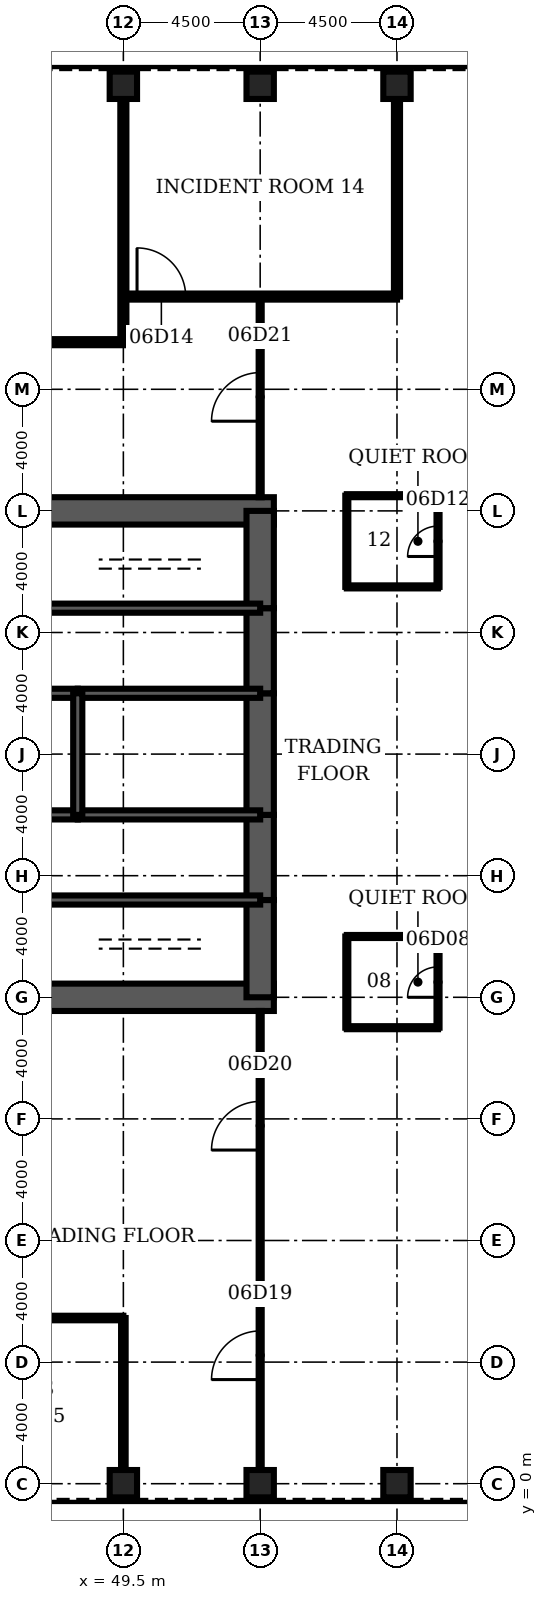
"""IFC4 building model, lengths in metres.
Left out: names, types, materials, properties, quantities, classifications, styles, units other than length and angle.
Written with IfcOpenShell. Run it as: python <this file> out.ifc"""

import sys

from ifc_helpers import new_model, si_unit, direction, frame, frame_2d, origin, origin_2d, place, context, subcontext, project, spatial, rectangle, hollow_rectangle, extrude, element, fill, save


model = new_model("IFC4")
c1 = context("Model", 3, precision=1e-05, world=origin(), true_north=direction((0.0, 1.0)))
c2 = subcontext(c1, "Body", "Model", "MODEL_VIEW")
j1 = project(units=[si_unit("LENGTHUNIT", "METRE"), si_unit("PLANEANGLEUNIT", "RADIAN")], contexts=[c1])
p1 = place(None, origin())
s1 = spatial("IfcSite", under=j1, at=p1, CompositionType="ELEMENT")
p2 = place(p1, origin())
s2 = spatial("IfcBuilding", under=s1, at=p2, CompositionType="ELEMENT")
p3 = place(p2, frame((0.0, 0.0, 32.0)))
s3 = spatial("IfcBuildingStorey", under=s2, at=p3, CompositionType="ELEMENT", Elevation=32.0)
for number, where, z_axis, x_axis in (
    (1, (49.5, 0.0, 0.0), (0.0, 0.0, 1.0), (0.0, 1.0, 0.0)),
    (2, (54.0, 0.0, 0.0), (0.0, 0.0, 1.0), (0.0, 1.0, 0.0)),
    (3, (58.5, 0.0, 0.0), (0.0, 0.0, 1.0), (0.0, 1.0, 0.0)),
    (4, (58.5, 46.0, 0.0), (0.0, 0.0, 1.0), (0.0, 1.0, 0.0)),
    (5, (54.0, 46.0, 0.0), (0.0, 0.0, 1.0), (0.0, 1.0, 0.0)),
    (6, (49.5, 46.0, 0.0), (0.0, 0.0, 1.0), (0.0, 1.0, 0.0)),
):
    element("IfcColumn", number, at=place(p3, frame(where, z_axis=z_axis, x_axis=x_axis)), inside=s3, PredefinedType="COLUMN", context=c2, shape_type="SweptSolid", body=[
        extrude(hollow_rectangle(XDim=0.9, YDim=0.9, WallThickness=0.12, at=origin_2d()), origin(), (0.0, 0.0, 1.0), 4.5),
    ])
for number, where, z_axis, x_axis in (
    (7, (45.0, 16.0, 0.0), (0.0, 0.0, 1.0), (1.0, 0.0, 0.0)),
    (8, (54.45, 32.0, 0.0), (0.0, 0.0, 1.0), (-1.0, 0.0, 0.0)),
):
    element("IfcWall", number, at=place(p3, frame(where, z_axis=z_axis, x_axis=x_axis)), inside=s3, PredefinedType="SHEAR", context=c2, shape_type="SweptSolid", body=[
        extrude(rectangle(XDim=9.45, YDim=0.9, at=frame_2d((4.725, 0.0))), origin(), (0.0, 0.0, 1.0), 4.5),
    ])
p4 = place(p3, frame((54.0, 16.0, 0.0), z_axis=(0.0, 0.0, 1.0), x_axis=(0.0, 1.0, 0.0)))
e9 = element("IfcWall", 9, at=p4, inside=s3, PredefinedType="SHEAR", context=c2, shape_type="SweptSolid", body=[
    extrude(rectangle(XDim=3.2, YDim=0.9, at=frame_2d((1.6, 0.0))), origin(), (0.0, 0.0, 1.0), 4.5),
])
p5 = place(p3, frame((54.0, 19.2, 0.0), z_axis=(0.0, 0.0, 1.0), x_axis=(0.0, 1.0, 0.0)))
e10 = element("IfcWall", 10, at=p5, inside=s3, PredefinedType="SHEAR", context=c2, shape_type="SweptSolid", body=[
    extrude(rectangle(XDim=2.8, YDim=0.9, at=frame_2d((1.4, 0.0))), origin(), (0.0, 0.0, 1.0), 4.5),
])
p6 = place(p5, frame((0.4, 0.0, 0.0)))
e11 = element("IfcOpeningElement", 11, at=p6, cuts=e10, PredefinedType="OPENING", context=c2, shape_type="SweptSolid", body=[
    extrude(rectangle(XDim=1.8, YDim=2.1, at=frame_2d((0.9, 1.05))), frame((0.0, 0.46, 0.0), z_axis=(0.0, -1.0, 0.0), x_axis=(1.0, 0.0, 0.0)), (0.0, 0.0, 1.0), 0.92),
])
p7 = place(p3, frame((54.0, 22.0, 0.0), z_axis=(0.0, 0.0, 1.0), x_axis=(0.0, 1.0, 0.0)))
e12 = element("IfcWall", 12, at=p7, inside=s3, PredefinedType="SHEAR", context=c2, shape_type="SweptSolid", body=[
    extrude(rectangle(XDim=4.0, YDim=0.9, at=frame_2d((2.0, 0.0))), origin(), (0.0, 0.0, 1.0), 4.5),
])
p8 = place(p3, frame((54.0, 26.0, 0.0), z_axis=(0.0, 0.0, 1.0), x_axis=(0.0, 1.0, 0.0)))
e13 = element("IfcWall", 13, at=p8, inside=s3, PredefinedType="SHEAR", context=c2, shape_type="SweptSolid", body=[
    extrude(rectangle(XDim=2.8, YDim=0.9, at=frame_2d((1.4, 0.0))), origin(), (0.0, 0.0, 1.0), 4.5),
])
p9 = place(p8, frame((0.6, 0.0, 0.0)))
e14 = element("IfcOpeningElement", 14, at=p9, cuts=e13, PredefinedType="OPENING", context=c2, shape_type="SweptSolid", body=[
    extrude(rectangle(XDim=1.8, YDim=2.1, at=frame_2d((0.9, 1.05))), frame((0.0, 0.46, 0.0), z_axis=(0.0, -1.0, 0.0), x_axis=(1.0, 0.0, 0.0)), (0.0, 0.0, 1.0), 0.92),
])
p10 = place(p3, frame((54.0, 28.8, 0.0), z_axis=(0.0, 0.0, 1.0), x_axis=(0.0, 1.0, 0.0)))
e15 = element("IfcWall", 15, at=p10, inside=s3, PredefinedType="SHEAR", context=c2, shape_type="SweptSolid", body=[
    extrude(rectangle(XDim=3.2, YDim=0.9, at=frame_2d((1.6, 0.0))), origin(), (0.0, 0.0, 1.0), 4.5),
])
p11 = place(p3, frame((45.0, 19.2, 0.0), z_axis=(0.0, 0.0, 1.0), x_axis=(1.0, 0.0, 0.0)))
e16 = element("IfcWall", 16, at=p11, inside=s3, PredefinedType="SOLIDWALL", context=c2, shape_type="SweptSolid", body=[
    extrude(rectangle(XDim=9.0, YDim=0.3, at=frame_2d((4.5, 0.0))), origin(), (0.0, 0.0, 1.0), 4.5),
])
p12 = place(p11, frame((7.35, 0.0, 0.0)))
e17 = element("IfcOpeningElement", 17, at=p12, cuts=e16, PredefinedType="OPENING", context=c2, shape_type="SweptSolid", body=[
    extrude(rectangle(XDim=1.0, YDim=2.1, at=frame_2d((0.5, 1.05))), frame((0.0, 0.16, 0.0), z_axis=(0.0, -1.0, 0.0), x_axis=(1.0, 0.0, 0.0)), (0.0, 0.0, 1.0), 0.32),
])
p13 = place(p3, frame((45.0, 28.8, 0.0), z_axis=(0.0, 0.0, 1.0), x_axis=(1.0, 0.0, 0.0)))
e18 = element("IfcWall", 18, at=p13, inside=s3, PredefinedType="SOLIDWALL", context=c2, shape_type="SweptSolid", body=[
    extrude(rectangle(XDim=9.0, YDim=0.3, at=frame_2d((4.5, 0.0))), origin(), (0.0, 0.0, 1.0), 4.5),
])
p14 = place(p13, frame((7.35, 0.0, 0.0)))
e19 = element("IfcOpeningElement", 19, at=p14, cuts=e18, PredefinedType="OPENING", context=c2, shape_type="SweptSolid", body=[
    extrude(rectangle(XDim=1.0, YDim=2.1, at=frame_2d((0.5, 1.05))), frame((0.0, 0.16, 0.0), z_axis=(0.0, -1.0, 0.0), x_axis=(1.0, 0.0, 0.0)), (0.0, 0.0, 1.0), 0.32),
])
p15 = place(p3, frame((45.0, 22.0, 0.0), z_axis=(0.0, 0.0, 1.0), x_axis=(1.0, 0.0, 0.0)))
e20 = element("IfcWall", 20, at=p15, inside=s3, PredefinedType="SOLIDWALL", context=c2, shape_type="SweptSolid", body=[
    extrude(rectangle(XDim=3.0, YDim=0.3, at=frame_2d((1.5, 0.0))), origin(), (0.0, 0.0, 1.0), 4.5),
])
p16 = place(p15, frame((1.0, 0.0, 0.0)))
e21 = element("IfcOpeningElement", 21, at=p16, cuts=e20, PredefinedType="OPENING", context=c2, shape_type="SweptSolid", body=[
    extrude(rectangle(XDim=1.0, YDim=2.1, at=frame_2d((0.5, 1.05))), frame((0.0, 0.16, 0.0), z_axis=(0.0, -1.0, 0.0), x_axis=(1.0, 0.0, 0.0)), (0.0, 0.0, 1.0), 0.32),
])
p17 = place(p3, frame((48.0, 22.0, 0.0), z_axis=(0.0, 0.0, 1.0), x_axis=(1.0, 0.0, 0.0)))
e22 = element("IfcWall", 22, at=p17, inside=s3, PredefinedType="SOLIDWALL", context=c2, shape_type="SweptSolid", body=[
    extrude(rectangle(XDim=6.0, YDim=0.3, at=frame_2d((3.0, 0.0))), origin(), (0.0, 0.0, 1.0), 4.5),
])
p18 = place(p17, frame((2.0, 0.0, 0.0)))
e23 = element("IfcOpeningElement", 23, at=p18, cuts=e22, PredefinedType="OPENING", context=c2, shape_type="SweptSolid", body=[
    extrude(rectangle(XDim=1.0, YDim=2.1, at=frame_2d((0.5, 1.05))), frame((0.0, 0.16, 0.0), z_axis=(0.0, -1.0, 0.0), x_axis=(1.0, 0.0, 0.0)), (0.0, 0.0, 1.0), 0.32),
])
p19 = place(p3, frame((45.0, 26.0, 0.0), z_axis=(0.0, 0.0, 1.0), x_axis=(1.0, 0.0, 0.0)))
e24 = element("IfcWall", 24, at=p19, inside=s3, PredefinedType="SOLIDWALL", context=c2, shape_type="SweptSolid", body=[
    extrude(rectangle(XDim=3.0, YDim=0.3, at=frame_2d((1.5, 0.0))), origin(), (0.0, 0.0, 1.0), 4.5),
])
p20 = place(p3, frame((48.0, 26.0, 0.0), z_axis=(0.0, 0.0, 1.0), x_axis=(1.0, 0.0, 0.0)))
e25 = element("IfcWall", 25, at=p20, inside=s3, PredefinedType="SOLIDWALL", context=c2, shape_type="SweptSolid", body=[
    extrude(rectangle(XDim=6.0, YDim=0.3, at=frame_2d((3.0, 0.0))), origin(), (0.0, 0.0, 1.0), 4.5),
])
p21 = place(p3, frame((48.0, 22.0, 0.0), z_axis=(0.0, 0.0, 1.0), x_axis=(0.0, 1.0, 0.0)))
e26 = element("IfcWall", 26, at=p21, inside=s3, PredefinedType="SOLIDWALL", context=c2, shape_type="SweptSolid", body=[
    extrude(rectangle(XDim=4.0, YDim=0.3, at=frame_2d((2.0, 0.0))), origin(), (0.0, 0.0, 1.0), 4.5),
])
p22 = place(p3, frame((48.6, 19.35, 0.0), z_axis=(0.0, 0.0, 1.0), x_axis=(0.0, 1.0, 0.0)))
e27 = element("IfcWall", 27, at=p22, inside=s3, PredefinedType="PARTITIONING", context=c2, shape_type="SweptSolid", body=[
    extrude(rectangle(XDim=2.5, YDim=0.15, at=frame_2d((1.25, 0.0))), origin(), (0.0, 0.0, 1.0), 3.0),
])
p23 = place(p22, frame((1.15, 0.0, 0.0)))
e28 = element("IfcOpeningElement", 28, at=p23, cuts=e27, PredefinedType="OPENING", context=c2, shape_type="SweptSolid", body=[
    extrude(rectangle(XDim=1.0, YDim=2.1, at=frame_2d((0.5, 1.05))), frame((0.0, 0.085, 0.0), z_axis=(0.0, -1.0, 0.0), x_axis=(1.0, 0.0, 0.0)), (0.0, 0.0, 1.0), 0.17),
])
p24 = place(p3, frame((22.5, 5.45, 0.0), z_axis=(0.0, 0.0, 1.0), x_axis=(1.0, 0.0, 0.0)))
e29 = element("IfcWall", 29, at=p24, inside=s3, PredefinedType="PARTITIONING", context=c2, shape_type="SweptSolid", body=[
    extrude(rectangle(XDim=27.0, YDim=0.15, at=frame_2d((13.5, 0.0))), origin(), (0.0, 0.0, 1.0), 3.0),
])
p25 = place(p24, frame((0.45, 0.0, 0.0)))
e30 = element("IfcOpeningElement", 30, at=p25, cuts=e29, PredefinedType="OPENING", context=c2, shape_type="SweptSolid", body=[
    extrude(rectangle(XDim=1.0, YDim=2.1, at=frame_2d((0.5, 1.05))), frame((0.0, 0.085, 0.0), z_axis=(0.0, -1.0, 0.0), x_axis=(1.0, 0.0, 0.0)), (0.0, 0.0, 1.0), 0.17),
])
p26 = place(p24, frame((4.95, 0.0, 0.0)))
e31 = element("IfcOpeningElement", 31, at=p26, cuts=e29, PredefinedType="OPENING", context=c2, shape_type="SweptSolid", body=[
    extrude(rectangle(XDim=1.0, YDim=2.1, at=frame_2d((0.5, 1.05))), frame((0.0, 0.085, 0.0), z_axis=(0.0, -1.0, 0.0), x_axis=(1.0, 0.0, 0.0)), (0.0, 0.0, 1.0), 0.17),
])
p27 = place(p24, frame((9.45, 0.0, 0.0)))
e32 = element("IfcOpeningElement", 32, at=p27, cuts=e29, PredefinedType="OPENING", context=c2, shape_type="SweptSolid", body=[
    extrude(rectangle(XDim=1.0, YDim=2.1, at=frame_2d((0.5, 1.05))), frame((0.0, 0.085, 0.0), z_axis=(0.0, -1.0, 0.0), x_axis=(1.0, 0.0, 0.0)), (0.0, 0.0, 1.0), 0.17),
])
p28 = place(p24, frame((13.95, 0.0, 0.0)))
e33 = element("IfcOpeningElement", 33, at=p28, cuts=e29, PredefinedType="OPENING", context=c2, shape_type="SweptSolid", body=[
    extrude(rectangle(XDim=1.0, YDim=2.1, at=frame_2d((0.5, 1.05))), frame((0.0, 0.085, 0.0), z_axis=(0.0, -1.0, 0.0), x_axis=(1.0, 0.0, 0.0)), (0.0, 0.0, 1.0), 0.17),
])
p29 = place(p24, frame((22.0, 0.0, 0.0)))
e34 = element("IfcOpeningElement", 34, at=p29, cuts=e29, PredefinedType="OPENING", context=c2, shape_type="SweptSolid", body=[
    extrude(rectangle(XDim=1.0, YDim=2.1, at=frame_2d((0.5, 1.05))), frame((0.0, 0.085, 0.0), z_axis=(0.0, -1.0, 0.0), x_axis=(1.0, 0.0, 0.0)), (0.0, 0.0, 1.0), 0.17),
])
for number, where, z_axis, x_axis in (
    (35, (56.85, 15.0, 0.0), (0.0, 0.0, 1.0), (1.0, 0.0, 0.0)),
    (36, (56.85, 18.0, 0.0), (0.0, 0.0, 1.0), (1.0, 0.0, 0.0)),
    (37, (56.85, 29.5, 0.0), (0.0, 0.0, 1.0), (1.0, 0.0, 0.0)),
    (38, (56.85, 32.5, 0.0), (0.0, 0.0, 1.0), (1.0, 0.0, 0.0)),
):
    element("IfcWall", number, at=place(p3, frame(where, z_axis=z_axis, x_axis=x_axis)), inside=s3, PredefinedType="PARTITIONING", context=c2, shape_type="SweptSolid", body=[
        extrude(rectangle(XDim=3.0, YDim=0.1, at=frame_2d((1.5, 0.0))), origin(), (0.0, 0.0, 1.0), 3.0),
    ])
p30 = place(p3, frame((22.5, 37.55, 0.0), z_axis=(0.0, 0.0, 1.0), x_axis=(1.0, 0.0, 0.0)))
e39 = element("IfcWall", 39, at=p30, inside=s3, PredefinedType="PARTITIONING", context=c2, shape_type="SweptSolid", body=[
    extrude(rectangle(XDim=27.0, YDim=0.2, at=frame_2d((13.5, 0.0))), origin(), (0.0, 0.0, 1.0), 3.0),
])
p31 = place(p30, frame((12.7, 0.0, 0.0)))
e40 = element("IfcOpeningElement", 40, at=p31, cuts=e39, PredefinedType="OPENING", context=c2, shape_type="SweptSolid", body=[
    extrude(rectangle(XDim=1.6, YDim=2.1, at=frame_2d((0.8, 1.05))), frame((0.0, 0.11, 0.0), z_axis=(0.0, -1.0, 0.0), x_axis=(1.0, 0.0, 0.0)), (0.0, 0.0, 1.0), 0.22),
])
p32 = place(p3, frame((49.5, 39.05, 0.0), z_axis=(0.0, 0.0, 1.0), x_axis=(1.0, 0.0, 0.0)))
e41 = element("IfcWall", 41, at=p32, inside=s3, PredefinedType="PARTITIONING", context=c2, shape_type="SweptSolid", body=[
    extrude(rectangle(XDim=9.0, YDim=0.2, at=frame_2d((4.5, 0.0))), origin(), (0.0, 0.0, 1.0), 3.0),
])
p33 = place(p32, frame((0.45, 0.0, 0.0)))
e42 = element("IfcOpeningElement", 42, at=p33, cuts=e41, PredefinedType="OPENING", context=c2, shape_type="SweptSolid", body=[
    extrude(rectangle(XDim=1.6, YDim=2.1, at=frame_2d((0.8, 1.05))), frame((0.0, 0.11, 0.0), z_axis=(0.0, -1.0, 0.0), x_axis=(1.0, 0.0, 0.0)), (0.0, 0.0, 1.0), 0.22),
])
p34 = place(p3, frame((49.5, 0.45, 0.0), z_axis=(0.0, 0.0, 1.0), x_axis=(0.0, 1.0, 0.0)))
e43 = element("IfcWall", 43, at=p34, inside=s3, PredefinedType="PARTITIONING", context=c2, shape_type="SweptSolid", body=[
    extrude(rectangle(XDim=5.0, YDim=0.15, at=frame_2d((2.5, 0.0))), origin(), (0.0, 0.0, 1.0), 3.0),
])
p35 = place(p3, frame((49.5, 37.55, 0.0), z_axis=(0.0, 0.0, 1.0), x_axis=(0.0, 1.0, 0.0)))
e44 = element("IfcWall", 44, at=p35, inside=s3, PredefinedType="PARTITIONING", context=c2, shape_type="SweptSolid", body=[
    extrude(rectangle(XDim=8.0, YDim=0.2, at=frame_2d((4.0, 0.0))), origin(), (0.0, 0.0, 1.0), 3.0),
])
p36 = place(p3, frame((54.0, 0.45, 0.0), z_axis=(0.0, 0.0, 1.0), x_axis=(0.0, 1.0, 0.0)))
e45 = element("IfcWall", 45, at=p36, inside=s3, PredefinedType="PARTITIONING", context=c2, shape_type="SweptSolid", body=[
    extrude(rectangle(XDim=15.1, YDim=0.1, at=frame_2d((7.55, 0.0))), origin(), (0.0, 0.0, 1.0), 3.0),
])
p37 = place(p36, frame((2.975, 0.0, 0.0)))
e46 = element("IfcOpeningElement", 46, at=p37, cuts=e45, PredefinedType="OPENING", context=c2, shape_type="SweptSolid", body=[
    extrude(rectangle(XDim=1.6, YDim=2.1, at=frame_2d((0.8, 1.05))), frame((0.0, 0.06, 0.0), z_axis=(0.0, -1.0, 0.0), x_axis=(1.0, 0.0, 0.0)), (0.0, 0.0, 1.0), 0.12),
])
p38 = place(p36, frame((10.525, 0.0, 0.0)))
e47 = element("IfcOpeningElement", 47, at=p38, cuts=e45, PredefinedType="OPENING", context=c2, shape_type="SweptSolid", body=[
    extrude(rectangle(XDim=1.6, YDim=2.1, at=frame_2d((0.8, 1.05))), frame((0.0, 0.06, 0.0), z_axis=(0.0, -1.0, 0.0), x_axis=(1.0, 0.0, 0.0)), (0.0, 0.0, 1.0), 0.12),
])
p39 = place(p3, frame((54.0, 32.45, 0.0), z_axis=(0.0, 0.0, 1.0), x_axis=(0.0, 1.0, 0.0)))
e48 = element("IfcWall", 48, at=p39, inside=s3, PredefinedType="PARTITIONING", context=c2, shape_type="SweptSolid", body=[
    extrude(rectangle(XDim=6.6, YDim=0.1, at=frame_2d((3.3, 0.0))), origin(), (0.0, 0.0, 1.0), 3.0),
])
p40 = place(p39, frame((2.5, 0.0, 0.0)))
e49 = element("IfcOpeningElement", 49, at=p40, cuts=e48, PredefinedType="OPENING", context=c2, shape_type="SweptSolid", body=[
    extrude(rectangle(XDim=1.6, YDim=2.1, at=frame_2d((0.8, 1.05))), frame((0.0, 0.06, 0.0), z_axis=(0.0, -1.0, 0.0), x_axis=(1.0, 0.0, 0.0)), (0.0, 0.0, 1.0), 0.12),
])
for number, where, z_axis, x_axis in (
    (50, (56.85, 15.0, 0.0), (0.0, 0.0, 1.0), (0.0, 1.0, 0.0)),
    (51, (56.85, 29.5, 0.0), (0.0, 0.0, 1.0), (0.0, 1.0, 0.0)),
):
    element("IfcWall", number, at=place(p3, frame(where, z_axis=z_axis, x_axis=x_axis)), inside=s3, PredefinedType="PARTITIONING", context=c2, shape_type="SweptSolid", body=[
        extrude(rectangle(XDim=3.0, YDim=0.1, at=frame_2d((1.5, 0.0))), origin(), (0.0, 0.0, 1.0), 3.0),
    ])
p41 = place(p3, frame((58.5, 39.05, 0.0), z_axis=(0.0, 0.0, 1.0), x_axis=(0.0, 1.0, 0.0)))
e52 = element("IfcWall", 52, at=p41, inside=s3, PredefinedType="PARTITIONING", context=c2, shape_type="SweptSolid", body=[
    extrude(rectangle(XDim=6.5, YDim=0.2, at=frame_2d((3.25, 0.0))), origin(), (0.0, 0.0, 1.0), 3.0),
])
p42 = place(p3, frame((59.85, 15.0, 0.0), z_axis=(0.0, 0.0, 1.0), x_axis=(0.0, 1.0, 0.0)))
e53 = element("IfcWall", 53, at=p42, inside=s3, PredefinedType="PARTITIONING", context=c2, shape_type="SweptSolid", body=[
    extrude(rectangle(XDim=3.0, YDim=0.1, at=frame_2d((1.5, 0.0))), origin(), (0.0, 0.0, 1.0), 3.0),
])
p43 = place(p42, frame((1.0, 0.0, 0.0)))
e54 = element("IfcOpeningElement", 54, at=p43, cuts=e53, PredefinedType="OPENING", context=c2, shape_type="SweptSolid", body=[
    extrude(rectangle(XDim=1.0, YDim=2.1, at=frame_2d((0.5, 1.05))), frame((0.0, 0.06, 0.0), z_axis=(0.0, -1.0, 0.0), x_axis=(1.0, 0.0, 0.0)), (0.0, 0.0, 1.0), 0.12),
])
p44 = place(p3, frame((59.85, 29.5, 0.0), z_axis=(0.0, 0.0, 1.0), x_axis=(0.0, 1.0, 0.0)))
e55 = element("IfcWall", 55, at=p44, inside=s3, PredefinedType="PARTITIONING", context=c2, shape_type="SweptSolid", body=[
    extrude(rectangle(XDim=3.0, YDim=0.1, at=frame_2d((1.5, 0.0))), origin(), (0.0, 0.0, 1.0), 3.0),
])
p45 = place(p44, frame((1.0, 0.0, 0.0)))
e56 = element("IfcOpeningElement", 56, at=p45, cuts=e55, PredefinedType="OPENING", context=c2, shape_type="SweptSolid", body=[
    extrude(rectangle(XDim=1.0, YDim=2.1, at=frame_2d((0.5, 1.05))), frame((0.0, 0.06, 0.0), z_axis=(0.0, -1.0, 0.0), x_axis=(1.0, 0.0, 0.0)), (0.0, 0.0, 1.0), 0.12),
])
p46 = place(p23, origin())
e57 = element("IfcDoor", 57, at=p46, inside=s3, OperationType="SINGLE_SWING_RIGHT", PredefinedType="DOOR", context=c2, shape_type="SweptSolid", body=[
    extrude(rectangle(XDim=1.0, YDim=2.1, at=frame_2d((0.5, 1.05))), frame((0.0, 0.025, 0.0), z_axis=(0.0, -1.0, 0.0), x_axis=(1.0, 0.0, 0.0)), (0.0, 0.0, 1.0), 0.05),
])
fill(e28, e57)
p47 = place(p43, origin())
e58 = element("IfcDoor", 58, at=p47, inside=s3, OperationType="SINGLE_SWING_LEFT", PredefinedType="DOOR", context=c2, shape_type="SweptSolid", body=[
    extrude(rectangle(XDim=1.0, YDim=2.1, at=frame_2d((0.5, 1.05))), frame((0.0, 0.025, 0.0), z_axis=(0.0, -1.0, 0.0), x_axis=(1.0, 0.0, 0.0)), (0.0, 0.0, 1.0), 0.05),
])
fill(e54, e58)
p48 = place(p45, origin())
e59 = element("IfcDoor", 59, at=p48, inside=s3, OperationType="SINGLE_SWING_LEFT", PredefinedType="DOOR", context=c2, shape_type="SweptSolid", body=[
    extrude(rectangle(XDim=1.0, YDim=2.1, at=frame_2d((0.5, 1.05))), frame((0.0, 0.025, 0.0), z_axis=(0.0, -1.0, 0.0), x_axis=(1.0, 0.0, 0.0)), (0.0, 0.0, 1.0), 0.05),
])
fill(e56, e59)
p49 = place(p33, origin())
e60 = element("IfcDoor", 60, at=p49, inside=s3, OperationType="SINGLE_SWING_LEFT", PredefinedType="DOOR", context=c2, shape_type="SweptSolid", body=[
    extrude(rectangle(XDim=1.6, YDim=2.1, at=frame_2d((0.8, 1.05))), frame((0.0, 0.025, 0.0), z_axis=(0.0, -1.0, 0.0), x_axis=(1.0, 0.0, 0.0)), (0.0, 0.0, 1.0), 0.05),
])
fill(e42, e60)
p50 = place(p37, origin())
e61 = element("IfcDoor", 61, at=p50, inside=s3, OperationType="SINGLE_SWING_LEFT", PredefinedType="DOOR", context=c2, shape_type="SweptSolid", body=[
    extrude(rectangle(XDim=1.6, YDim=2.1, at=frame_2d((0.8, 1.05))), frame((0.0, 0.025, 0.0), z_axis=(0.0, -1.0, 0.0), x_axis=(1.0, 0.0, 0.0)), (0.0, 0.0, 1.0), 0.05),
])
fill(e46, e61)
p51 = place(p38, origin())
e62 = element("IfcDoor", 62, at=p51, inside=s3, OperationType="SINGLE_SWING_LEFT", PredefinedType="DOOR", context=c2, shape_type="SweptSolid", body=[
    extrude(rectangle(XDim=1.6, YDim=2.1, at=frame_2d((0.8, 1.05))), frame((0.0, 0.025, 0.0), z_axis=(0.0, -1.0, 0.0), x_axis=(1.0, 0.0, 0.0)), (0.0, 0.0, 1.0), 0.05),
])
fill(e47, e62)
p52 = place(p40, origin())
e63 = element("IfcDoor", 63, at=p52, inside=s3, OperationType="SINGLE_SWING_LEFT", PredefinedType="DOOR", context=c2, shape_type="SweptSolid", body=[
    extrude(rectangle(XDim=1.6, YDim=2.1, at=frame_2d((0.8, 1.05))), frame((0.0, 0.025, 0.0), z_axis=(0.0, -1.0, 0.0), x_axis=(1.0, 0.0, 0.0)), (0.0, 0.0, 1.0), 0.05),
])
fill(e49, e63)
p53 = place(p12, origin())
e64 = element("IfcDoor", 64, at=p53, inside=s3, OperationType="SINGLE_SWING_RIGHT", PredefinedType="DOOR", context=c2, shape_type="SweptSolid", body=[
    extrude(rectangle(XDim=1.0, YDim=2.1, at=frame_2d((0.5, 1.05))), frame((0.0, 0.025, 0.0), z_axis=(0.0, -1.0, 0.0), x_axis=(1.0, 0.0, 0.0)), (0.0, 0.0, 1.0), 0.05),
])
fill(e17, e64)
p54 = place(p14, origin())
e65 = element("IfcDoor", 65, at=p54, inside=s3, OperationType="SINGLE_SWING_RIGHT", PredefinedType="DOOR", context=c2, shape_type="SweptSolid", body=[
    extrude(rectangle(XDim=1.0, YDim=2.1, at=frame_2d((0.5, 1.05))), frame((0.0, 0.025, 0.0), z_axis=(0.0, -1.0, 0.0), x_axis=(1.0, 0.0, 0.0)), (0.0, 0.0, 1.0), 0.05),
])
fill(e19, e65)
p55 = place(p6, origin())
e66 = element("IfcDoor", 66, at=p55, inside=s3, OperationType="SINGLE_SWING_LEFT", PredefinedType="DOOR", context=c2, shape_type="SweptSolid", body=[
    extrude(rectangle(XDim=1.8, YDim=2.1, at=frame_2d((0.9, 1.05))), frame((0.0, 0.45, 0.0), z_axis=(0.0, -1.0, 0.0), x_axis=(1.0, 0.0, 0.0)), (0.0, 0.0, 1.0), 0.899),
])
fill(e11, e66)
p56 = place(p9, origin())
e67 = element("IfcDoor", 67, at=p56, inside=s3, OperationType="SINGLE_SWING_LEFT", PredefinedType="DOOR", context=c2, shape_type="SweptSolid", body=[
    extrude(rectangle(XDim=1.8, YDim=2.1, at=frame_2d((0.9, 1.05))), frame((0.0, 0.45, 0.0), z_axis=(0.0, -1.0, 0.0), x_axis=(1.0, 0.0, 0.0)), (0.0, 0.0, 1.0), 0.899),
])
fill(e14, e67)
p57 = place(p18, origin())
e68 = element("IfcDoor", 68, at=p57, inside=s3, OperationType="SINGLE_SWING_LEFT", PredefinedType="DOOR", context=c2, shape_type="SweptSolid", body=[
    extrude(rectangle(XDim=1.0, YDim=2.1, at=frame_2d((0.5, 1.05))), frame((0.0, 0.025, 0.0), z_axis=(0.0, -1.0, 0.0), x_axis=(1.0, 0.0, 0.0)), (0.0, 0.0, 1.0), 0.05),
])
fill(e23, e68)
save(model, sys.argv[1])
